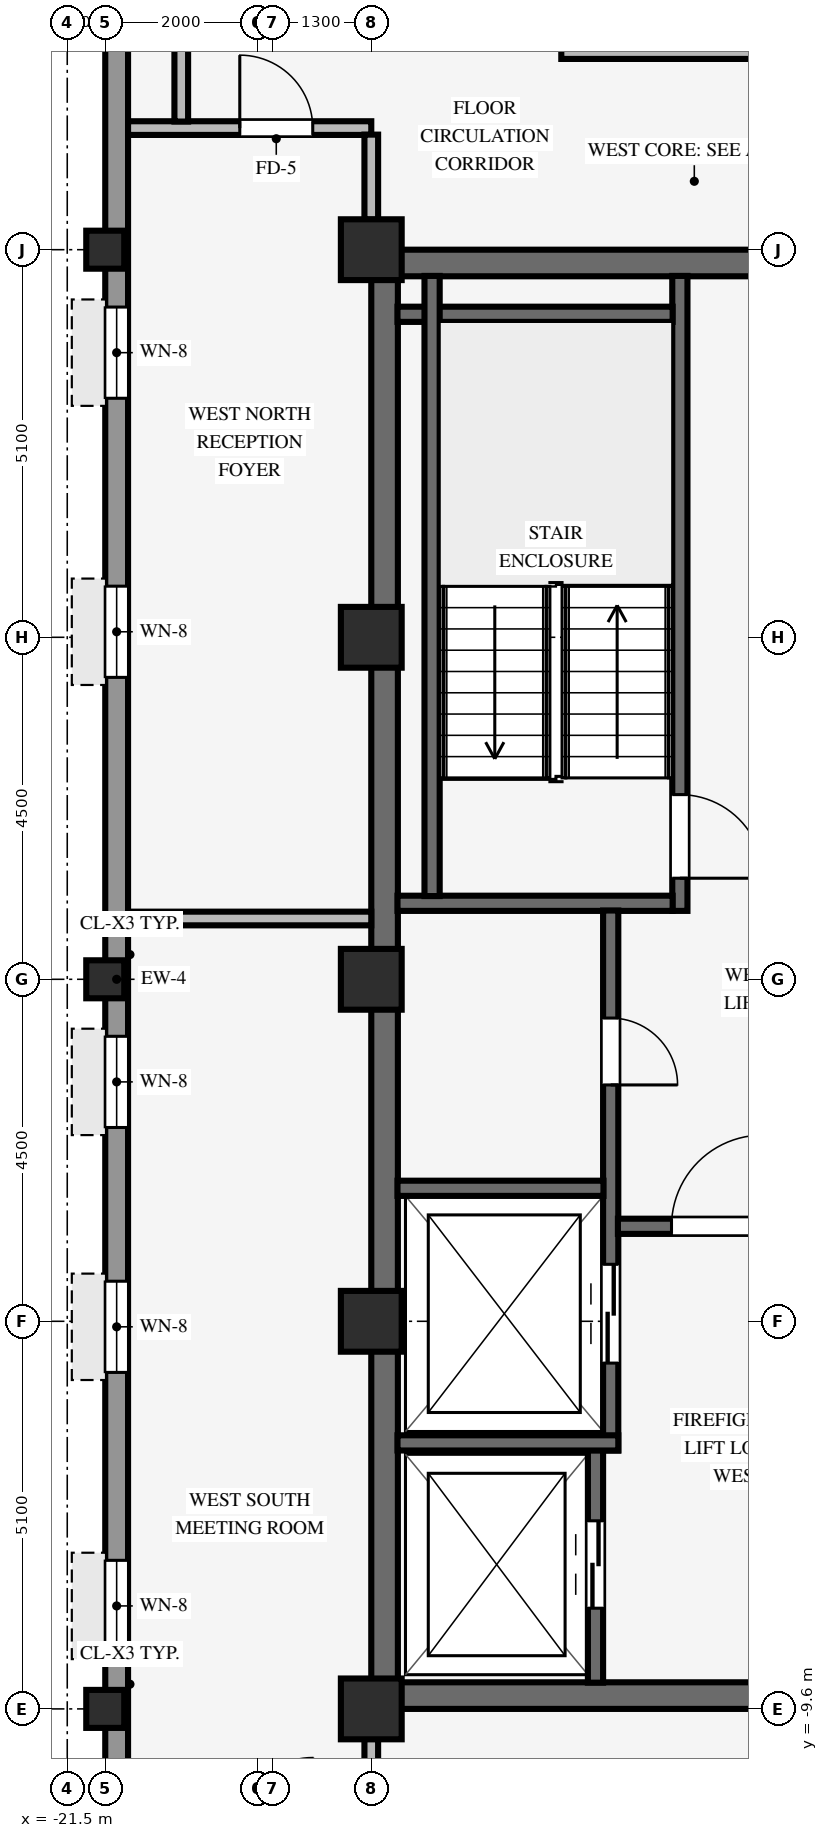
"""IFC4 building model, lengths in metres.
Left out: names, types, materials, properties, quantities, classifications, styles, units other than length and angle.
Written with IfcOpenShell. Run it as: python <this file> out.ifc"""

import sys

from ifc_helpers import new_model, si_unit, direction, frame, frame_2d, origin, origin_2d, place, context, subcontext, project, spatial, rectangle, hollow_rectangle, extrude, source, transform, mapped, element, fill, save


model = new_model("IFC4")
c1 = context("Model", 3, precision=1e-05, world=origin(), true_north=direction((0.0, 1.0)))
c2 = subcontext(c1, "Body", "Model", "MODEL_VIEW")
j1 = project(units=[si_unit("LENGTHUNIT", "METRE"), si_unit("PLANEANGLEUNIT", "RADIAN")], contexts=[c1])
p1 = place(None, origin())
s1 = spatial("IfcSite", under=j1, at=p1, CompositionType="ELEMENT")
p2 = place(p1, origin())
s2 = spatial("IfcBuilding", under=s1, at=p2, CompositionType="ELEMENT")
p3 = place(p2, frame((0.0, 0.0, 279.85)))
s3 = spatial("IfcBuildingStorey", under=s2, at=p3, CompositionType="ELEMENT", Elevation=279.85)
for number, where, z_axis, x_axis in (
    (1, (-17.5, -9.425, 0.0), (0.0, 0.0, 1.0), (1.0, 0.0, 0.0)),
    (2, (-17.5, 9.425, 0.0), (0.0, 0.0, 1.0), (1.0, 0.0, 0.0)),
):
    element("IfcWall", number, at=place(p3, frame(where, z_axis=z_axis, x_axis=x_axis)), inside=s3, PredefinedType="SHEAR", context=c2, shape_type="SweptSolid", body=[
        extrude(rectangle(XDim=8.5, YDim=0.35, at=frame_2d((4.25, 0.0))), origin(), (0.0, 0.0, 1.0), 3.37),
    ])
p4 = place(p3, frame((-17.325, -9.255, 0.0), z_axis=(0.0, 0.0, 1.0), x_axis=(0.0, 1.0, 0.0)))
e3 = element("IfcWall", 3, at=p4, inside=s3, PredefinedType="SHEAR", context=c2, shape_type="SweptSolid", body=[
    extrude(rectangle(XDim=18.51, YDim=0.35, at=frame_2d((9.255, 0.0))), origin(), (0.0, 0.0, 1.0), 3.37),
])
for number, where, z_axis, x_axis in (
    (4, (-17.5, -9.6, 0.0), (0.0, 0.0, 1.0), (1.0, 0.0, 0.0)),
    (5, (-17.5, -4.5, 0.0), (0.0, 0.0, 1.0), (1.0, 0.0, 0.0)),
    (6, (-17.5, 4.5, 0.0), (0.0, 0.0, 1.0), (1.0, 0.0, 0.0)),
    (7, (-17.5, 9.6, 0.0), (0.0, 0.0, 1.0), (1.0, 0.0, 0.0)),
    (8, (-17.5, 0.0, 0.0), (0.0, 0.0, 1.0), (1.0, 0.0, 0.0)),
):
    element("IfcColumn", number, at=place(p3, frame(where, z_axis=z_axis, x_axis=x_axis)), inside=s3, PredefinedType="COLUMN", context=c2, shape_type="SweptSolid", body=[
        extrude(rectangle(XDim=0.8, YDim=0.8, at=origin_2d()), origin(), (0.0, 0.0, 1.0), 3.37),
    ])
for number, where, z_axis, x_axis in (
    (9, (-21.0, -9.6, 0.0), (0.0, 0.0, 1.0), (1.0, 0.0, 0.0)),
    (10, (-21.0, 0.0, 0.0), (0.0, 0.0, 1.0), (1.0, 0.0, 0.0)),
    (11, (-21.0, 9.6, 0.0), (0.0, 0.0, 1.0), (1.0, 0.0, 0.0)),
):
    element("IfcColumn", number, at=place(p3, frame(where, z_axis=z_axis, x_axis=x_axis)), inside=s3, PredefinedType="COLUMN", context=c2, shape_type="SweptSolid", body=[
        extrude(hollow_rectangle(XDim=0.5, YDim=0.5, WallThickness=0.032, InnerFilletRadius=0.032, OuterFilletRadius=0.064, at=origin_2d()), origin(), (0.0, 0.0, 1.0), 3.37),
    ])
p5 = place(p3, frame((-20.85, -17.004, 0.0), z_axis=(0.0, 0.0, 1.0), x_axis=(0.0, 1.0, 0.0)))
e12 = element("IfcWall", 12, at=p5, inside=s3, PredefinedType="STANDARD", context=c2, shape_type="SweptSolid", body=[
    extrude(rectangle(XDim=34.008, YDim=0.3, at=frame_2d((17.004, 0.0))), origin(), (0.0, 0.0, 1.0), 2.705),
])
p6 = place(p5, frame((1.786, 0.0, 0.8)))
e13 = element("IfcOpeningElement", 13, at=p6, cuts=e12, PredefinedType="OPENING", context=c2, shape_type="SweptSolid", body=[
    extrude(rectangle(XDim=1.2, YDim=1.48, at=frame_2d((0.6, 0.74))), frame((0.0, 0.16, 0.0), z_axis=(0.0, -1.0, 0.0), x_axis=(1.0, 0.0, 0.0)), (0.0, 0.0, 1.0), 0.32),
])
p7 = place(p5, frame((8.159, 0.0, 0.8)))
e14 = element("IfcOpeningElement", 14, at=p7, cuts=e12, PredefinedType="OPENING", context=c2, shape_type="SweptSolid", body=[
    extrude(rectangle(XDim=1.2, YDim=1.48, at=frame_2d((0.6, 0.74))), frame((0.0, 0.16, 0.0), z_axis=(0.0, -1.0, 0.0), x_axis=(1.0, 0.0, 0.0)), (0.0, 0.0, 1.0), 0.32),
])
p8 = place(p5, frame((11.831, 0.0, 0.8)))
e15 = element("IfcOpeningElement", 15, at=p8, cuts=e12, PredefinedType="OPENING", context=c2, shape_type="SweptSolid", body=[
    extrude(rectangle(XDim=1.2, YDim=1.48, at=frame_2d((0.6, 0.74))), frame((0.0, 0.16, 0.0), z_axis=(0.0, -1.0, 0.0), x_axis=(1.0, 0.0, 0.0)), (0.0, 0.0, 1.0), 0.32),
])
p9 = place(p5, frame((15.054, 0.0, 0.8)))
e16 = element("IfcOpeningElement", 16, at=p9, cuts=e12, PredefinedType="OPENING", context=c2, shape_type="SweptSolid", body=[
    extrude(rectangle(XDim=1.2, YDim=1.48, at=frame_2d((0.6, 0.74))), frame((0.0, 0.16, 0.0), z_axis=(0.0, -1.0, 0.0), x_axis=(1.0, 0.0, 0.0)), (0.0, 0.0, 1.0), 0.32),
])
p10 = place(p5, frame((20.977, 0.0, 0.8)))
e17 = element("IfcOpeningElement", 17, at=p10, cuts=e12, PredefinedType="OPENING", context=c2, shape_type="SweptSolid", body=[
    extrude(rectangle(XDim=1.2, YDim=1.48, at=frame_2d((0.6, 0.74))), frame((0.0, 0.16, 0.0), z_axis=(0.0, -1.0, 0.0), x_axis=(1.0, 0.0, 0.0)), (0.0, 0.0, 1.0), 0.32),
])
p11 = place(p5, frame((24.649, 0.0, 0.8)))
e18 = element("IfcOpeningElement", 18, at=p11, cuts=e12, PredefinedType="OPENING", context=c2, shape_type="SweptSolid", body=[
    extrude(rectangle(XDim=1.2, YDim=1.48, at=frame_2d((0.6, 0.74))), frame((0.0, 0.16, 0.0), z_axis=(0.0, -1.0, 0.0), x_axis=(1.0, 0.0, 0.0)), (0.0, 0.0, 1.0), 0.32),
])
p12 = place(p5, frame((31.022, 0.0, 0.8)))
e19 = element("IfcOpeningElement", 19, at=p12, cuts=e12, PredefinedType="OPENING", context=c2, shape_type="SweptSolid", body=[
    extrude(rectangle(XDim=1.2, YDim=1.48, at=frame_2d((0.6, 0.74))), frame((0.0, 0.16, 0.0), z_axis=(0.0, -1.0, 0.0), x_axis=(1.0, 0.0, 0.0)), (0.0, 0.0, 1.0), 0.32),
])
p13 = place(p3, frame((-13.44, 0.9, 0.0), z_axis=(0.0, 0.0, 1.0), x_axis=(0.0, 1.0, 0.0)))
e20 = element("IfcWall", 20, at=p13, inside=s3, PredefinedType="SHEAR", context=c2, shape_type="SweptSolid", body=[
    extrude(rectangle(XDim=8.355, YDim=0.2, at=frame_2d((4.177, 0.0))), origin(), (0.0, 0.0, 1.0), 3.37),
])
p14 = place(p13, frame((1.53, 0.0, 0.0), z_axis=(0.0, 0.0, 1.0), x_axis=(-1.0, 0.0, 0.0)))
e21 = element("IfcOpeningElement", 21, at=p14, cuts=e20, PredefinedType="OPENING", context=c2, shape_type="SweptSolid", body=[
    extrude(rectangle(XDim=1.1, YDim=2.15, at=frame_2d((0.55, 1.075))), frame((0.0, 0.11, 0.0), z_axis=(0.0, -1.0, 0.0), x_axis=(1.0, 0.0, 0.0)), (0.0, 0.0, 1.0), 0.22),
])
for number, where, z_axis, x_axis in (
    (22, (-17.155, 1.0, 0.0), (0.0, 0.0, 1.0), (1.0, 0.0, 0.0)),
    (23, (-17.155, 8.75, 0.0), (0.0, 0.0, 1.0), (1.0, 0.0, 0.0)),
):
    element("IfcWall", number, at=place(p3, frame(where, z_axis=z_axis, x_axis=x_axis)), inside=s3, PredefinedType="SHEAR", context=c2, shape_type="SweptSolid", body=[
        extrude(rectangle(XDim=3.62, YDim=0.2, at=frame_2d((1.81, 0.0))), origin(), (0.0, 0.0, 1.0), 3.37),
    ])
p15 = place(p3, frame((-16.7, 1.095, 0.0), z_axis=(0.0, 0.0, 1.0), x_axis=(0.0, 1.0, 0.0)))
e24 = element("IfcWall", 24, at=p15, inside=s3, PredefinedType="SHEAR", context=c2, shape_type="SweptSolid", body=[
    extrude(rectangle(XDim=8.16, YDim=0.2, at=frame_2d((4.08, 0.0))), origin(), (0.0, 0.0, 1.0), 3.37),
])
p16 = place(p3, frame((-14.55, -9.255, 0.0), z_axis=(0.0, 0.0, 1.0), x_axis=(0.0, 1.0, 0.0)))
e25 = element("IfcWall", 25, at=p16, inside=s3, PredefinedType="SHEAR", context=c2, shape_type="SweptSolid", body=[
    extrude(rectangle(XDim=3.06, YDim=0.2, at=frame_2d((1.53, 0.0))), origin(), (0.0, 0.0, 1.0), 3.37),
])
p17 = place(p16, frame((0.98, 0.0, 0.0)))
e26 = element("IfcOpeningElement", 26, at=p17, cuts=e25, PredefinedType="OPENING", context=c2, shape_type="SweptSolid", body=[
    extrude(rectangle(XDim=1.15, YDim=2.15, at=frame_2d((0.575, 1.075))), frame((0.0, 0.11, 0.0), z_axis=(0.0, -1.0, 0.0), x_axis=(1.0, 0.0, 0.0)), (0.0, 0.0, 1.0), 0.22),
])
p18 = place(p3, frame((-14.35, -6.2, 0.0), z_axis=(0.0, 0.0, 1.0), x_axis=(0.0, 1.0, 0.0)))
e27 = element("IfcWall", 27, at=p18, inside=s3, PredefinedType="SHEAR", context=c2, shape_type="SweptSolid", body=[
    extrude(rectangle(XDim=7.105, YDim=0.2, at=frame_2d((3.552, 0.0))), origin(), (0.0, 0.0, 1.0), 3.37),
])
p19 = place(p18, frame((5.69, 0.0, 0.0), z_axis=(0.0, 0.0, 1.0), x_axis=(-1.0, 0.0, 0.0)))
e28 = element("IfcOpeningElement", 28, at=p19, cuts=e27, PredefinedType="OPENING", context=c2, shape_type="SweptSolid", body=[
    extrude(rectangle(XDim=0.88, YDim=2.1, at=frame_2d((0.44, 1.05))), frame((0.0, 0.11, 0.0), z_axis=(0.0, -1.0, 0.0), x_axis=(1.0, 0.0, 0.0)), (0.0, 0.0, 1.0), 0.22),
])
p20 = place(p18, frame((1.15, 0.0, 0.0)))
e29 = element("IfcOpeningElement", 29, at=p20, cuts=e27, PredefinedType="OPENING", context=c2, shape_type="SweptSolid", body=[
    extrude(rectangle(XDim=1.3, YDim=2.2, at=frame_2d((0.65, 1.1))), frame((0.0, 0.11, 0.0), z_axis=(0.0, -1.0, 0.0), x_axis=(1.0, 0.0, 0.0)), (0.0, 0.0, 1.0), 0.22),
])
p21 = place(p3, frame((-17.155, -6.1, 0.0), z_axis=(0.0, 0.0, 1.0), x_axis=(1.0, 0.0, 0.0)))
e30 = element("IfcWall", 30, at=p21, inside=s3, PredefinedType="SHEAR", context=c2, shape_type="SweptSolid", body=[
    extrude(rectangle(XDim=2.905, YDim=0.2, at=frame_2d((1.453, 0.0))), origin(), (0.0, 0.0, 1.0), 3.37),
])
p22 = place(p3, frame((-17.155, -2.75, 0.0), z_axis=(0.0, 0.0, 1.0), x_axis=(1.0, 0.0, 0.0)))
e31 = element("IfcWall", 31, at=p22, inside=s3, PredefinedType="SHEAR", context=c2, shape_type="SweptSolid", body=[
    extrude(rectangle(XDim=2.71, YDim=0.2, at=frame_2d((1.355, 0.0))), origin(), (0.0, 0.0, 1.0), 3.37),
])
p23 = place(p3, frame((-14.255, -3.25, 0.0), z_axis=(0.0, 0.0, 1.0), x_axis=(1.0, 0.0, 0.0)))
e32 = element("IfcWall", 32, at=p23, inside=s3, PredefinedType="SHEAR", context=c2, shape_type="SweptSolid", body=[
    extrude(rectangle(XDim=2.56, YDim=0.2, at=frame_2d((1.28, 0.0))), origin(), (0.0, 0.0, 1.0), 3.37),
])
p24 = place(p23, frame((0.705, 0.0, 0.0)))
e33 = element("IfcOpeningElement", 33, at=p24, cuts=e32, PredefinedType="OPENING", context=c2, shape_type="SweptSolid", body=[
    extrude(rectangle(XDim=1.2, YDim=2.15, at=frame_2d((0.6, 1.075))), frame((0.0, 0.11, 0.0), z_axis=(0.0, -1.0, 0.0), x_axis=(1.0, 0.0, 0.0)), (0.0, 0.0, 1.0), 0.22),
])
p25 = place(p3, frame((-20.7, 0.8, 0.0), z_axis=(0.0, 0.0, 1.0), x_axis=(1.0, 0.0, 0.0)))
e34 = element("IfcWall", 34, at=p25, inside=s3, PredefinedType="PARTITIONING", context=c2, shape_type="SweptSolid", body=[
    extrude(rectangle(XDim=3.2, YDim=0.18, at=frame_2d((1.6, 0.0))), origin(), (0.0, 0.0, 1.0), 3.36),
])
p26 = place(p3, frame((-20.7, 11.2, 0.0), z_axis=(0.0, 0.0, 1.0), x_axis=(1.0, 0.0, 0.0)))
e35 = element("IfcWall", 35, at=p26, inside=s3, PredefinedType="PARTITIONING", context=c2, shape_type="SweptSolid", body=[
    extrude(rectangle(XDim=3.2, YDim=0.18, at=frame_2d((1.6, 0.0))), origin(), (0.0, 0.0, 1.0), 3.36),
])
p27 = place(p26, frame((1.47, 0.0, 0.0)))
e36 = element("IfcOpeningElement", 36, at=p27, cuts=e35, PredefinedType="OPENING", context=c2, shape_type="SweptSolid", body=[
    extrude(rectangle(XDim=0.96, YDim=2.1, at=frame_2d((0.48, 1.05))), frame((0.0, 0.1, 0.0), z_axis=(0.0, -1.0, 0.0), x_axis=(1.0, 0.0, 0.0)), (0.0, 0.0, 1.0), 0.2),
])
p28 = place(p3, frame((-15.0, 12.2, 0.0), z_axis=(0.0, 0.0, 1.0), x_axis=(1.0, 0.0, 0.0)))
e37 = element("IfcWall", 37, at=p28, inside=s3, PredefinedType="PARTITIONING", context=c2, shape_type="SweptSolid", body=[
    extrude(rectangle(XDim=30.8, YDim=0.18, at=frame_2d((15.4, 0.0))), origin(), (0.0, 0.0, 1.0), 3.36),
])
p29 = place(p28, frame((11.52, 0.0, 0.0)))
e38 = element("IfcOpeningElement", 38, at=p29, cuts=e37, PredefinedType="OPENING", context=c2, shape_type="SweptSolid", body=[
    extrude(rectangle(XDim=0.96, YDim=2.1, at=frame_2d((0.48, 1.05))), frame((0.0, 0.1, 0.0), z_axis=(0.0, -1.0, 0.0), x_axis=(1.0, 0.0, 0.0)), (0.0, 0.0, 1.0), 0.2),
])
p30 = place(p28, frame((2.52, 0.0, 0.0)))
e39 = element("IfcOpeningElement", 39, at=p30, cuts=e37, PredefinedType="OPENING", context=c2, shape_type="SweptSolid", body=[
    extrude(rectangle(XDim=0.96, YDim=2.1, at=frame_2d((0.48, 1.05))), frame((0.0, 0.1, 0.0), z_axis=(0.0, -1.0, 0.0), x_axis=(1.0, 0.0, 0.0)), (0.0, 0.0, 1.0), 0.2),
])
p31 = place(p28, frame((28.32, 0.0, 0.0)))
e40 = element("IfcOpeningElement", 40, at=p31, cuts=e37, PredefinedType="OPENING", context=c2, shape_type="SweptSolid", body=[
    extrude(rectangle(XDim=0.96, YDim=2.1, at=frame_2d((0.48, 1.05))), frame((0.0, 0.1, 0.0), z_axis=(0.0, -1.0, 0.0), x_axis=(1.0, 0.0, 0.0)), (0.0, 0.0, 1.0), 0.2),
])
p32 = place(p28, frame((24.92, 0.0, 0.0)))
e41 = element("IfcOpeningElement", 41, at=p32, cuts=e37, PredefinedType="OPENING", context=c2, shape_type="SweptSolid", body=[
    extrude(rectangle(XDim=0.96, YDim=2.1, at=frame_2d((0.48, 1.05))), frame((0.0, 0.1, 0.0), z_axis=(0.0, -1.0, 0.0), x_axis=(1.0, 0.0, 0.0)), (0.0, 0.0, 1.0), 0.2),
])
p33 = place(p28, frame((16.2, 0.0, 0.0)))
e42 = element("IfcOpeningElement", 42, at=p33, cuts=e37, PredefinedType="OPENING", context=c2, shape_type="SweptSolid", body=[
    extrude(rectangle(XDim=0.9, YDim=2.1, at=frame_2d((0.45, 1.05))), frame((0.0, 0.1, 0.0), z_axis=(0.0, -1.0, 0.0), x_axis=(1.0, 0.0, 0.0)), (0.0, 0.0, 1.0), 0.2),
])
p34 = place(p28, frame((18.3, 0.0, 0.0)))
e43 = element("IfcOpeningElement", 43, at=p34, cuts=e37, PredefinedType="OPENING", context=c2, shape_type="SweptSolid", body=[
    extrude(rectangle(XDim=0.9, YDim=2.1, at=frame_2d((0.45, 1.05))), frame((0.0, 0.1, 0.0), z_axis=(0.0, -1.0, 0.0), x_axis=(1.0, 0.0, 0.0)), (0.0, 0.0, 1.0), 0.2),
])
p35 = place(p28, frame((20.25, 0.0, 0.0)))
e44 = element("IfcOpeningElement", 44, at=p35, cuts=e37, PredefinedType="OPENING", context=c2, shape_type="SweptSolid", body=[
    extrude(rectangle(XDim=0.9, YDim=2.1, at=frame_2d((0.45, 1.05))), frame((0.0, 0.1, 0.0), z_axis=(0.0, -1.0, 0.0), x_axis=(1.0, 0.0, 0.0)), (0.0, 0.0, 1.0), 0.2),
])
p36 = place(p3, frame((-20.0, 11.286, 0.0), z_axis=(0.0, 0.0, 1.0), x_axis=(0.0, 1.0, 0.0)))
e45 = element("IfcWall", 45, at=p36, inside=s3, PredefinedType="PARTITIONING", context=c2, shape_type="SweptSolid", body=[
    extrude(rectangle(XDim=2.228, YDim=0.18, at=frame_2d((1.114, 0.0))), origin(), (0.0, 0.0, 1.0), 3.36),
])
for number, where, z_axis, x_axis in (
    (46, (-17.5, -11.114, 0.0), (0.0, 0.0, 1.0), (0.0, 1.0, 0.0)),
    (47, (-17.5, 9.996, 0.0), (0.0, 0.0, 1.0), (0.0, 1.0, 0.0)),
):
    element("IfcWall", number, at=place(p3, frame(where, z_axis=z_axis, x_axis=x_axis)), inside=s3, PredefinedType="PARTITIONING", context=c2, shape_type="SweptSolid", body=[
        extrude(rectangle(XDim=1.118, YDim=0.18, at=frame_2d((0.559, 0.0))), origin(), (0.0, 0.0, 1.0), 2.892),
    ])
m1 = source(origin(), c2, "Body", "SweptSolid", [
    extrude(rectangle(XDim=1.2, YDim=1.48, at=frame_2d((0.6, 0.74))), frame((0.0, 0.03, 0.0), z_axis=(0.0, -1.0, 0.0), x_axis=(1.0, 0.0, 0.0)), (0.0, 0.0, 1.0), 0.06),
])
p37 = place(p7, origin())
e48 = element("IfcWindow", 48, at=p37, inside=s3, PartitioningType="SINGLE_PANEL", PredefinedType="WINDOW", context=c2, shape_type="MappedRepresentation", body=[
    mapped(m1, transform((0.0, 0.0, 0.0), scale=1.0)),
])
fill(e14, e48)
p38 = place(p8, origin())
e49 = element("IfcWindow", 49, at=p38, inside=s3, PartitioningType="SINGLE_PANEL", PredefinedType="WINDOW", context=c2, shape_type="MappedRepresentation", body=[
    mapped(m1, transform((0.0, 0.0, 0.0), scale=1.0)),
])
fill(e15, e49)
p39 = place(p9, origin())
e50 = element("IfcWindow", 50, at=p39, inside=s3, PartitioningType="SINGLE_PANEL", PredefinedType="WINDOW", context=c2, shape_type="MappedRepresentation", body=[
    mapped(m1, transform((0.0, 0.0, 0.0), scale=1.0)),
])
fill(e16, e50)
p40 = place(p10, origin())
e51 = element("IfcWindow", 51, at=p40, inside=s3, PartitioningType="SINGLE_PANEL", PredefinedType="WINDOW", context=c2, shape_type="MappedRepresentation", body=[
    mapped(m1, transform((0.0, 0.0, 0.0), scale=1.0)),
])
fill(e17, e51)
p41 = place(p11, origin())
e52 = element("IfcWindow", 52, at=p41, inside=s3, PartitioningType="SINGLE_PANEL", PredefinedType="WINDOW", context=c2, shape_type="MappedRepresentation", body=[
    mapped(m1, transform((0.0, 0.0, 0.0), scale=1.0)),
])
fill(e18, e52)
m2 = source(origin(), c2, "Body", "SweptSolid", [
    extrude(rectangle(XDim=1.1, YDim=2.15, at=frame_2d((0.55, 1.075))), frame((0.0, 0.025, 0.0), z_axis=(0.0, -1.0, 0.0), x_axis=(1.0, 0.0, 0.0)), (0.0, 0.0, 1.0), 0.05),
])
p42 = place(p14, origin())
e53 = element("IfcDoor", 53, at=p42, inside=s3, OperationType="SINGLE_SWING_RIGHT", PredefinedType="DOOR", context=c2, shape_type="MappedRepresentation", body=[
    mapped(m2, transform((0.0, 0.0, 0.0), scale=1.0)),
])
fill(e21, e53)
m3 = source(origin(), c2, "Body", "SweptSolid", [
    extrude(rectangle(XDim=0.88, YDim=2.1, at=frame_2d((0.44, 1.05))), frame((0.0, 0.025, 0.0), z_axis=(0.0, -1.0, 0.0), x_axis=(1.0, 0.0, 0.0)), (0.0, 0.0, 1.0), 0.05),
])
p43 = place(p19, origin())
e54 = element("IfcDoor", 54, at=p43, inside=s3, OperationType="SINGLE_SWING_RIGHT", PredefinedType="DOOR", context=c2, shape_type="MappedRepresentation", body=[
    mapped(m3, transform((0.0, 0.0, 0.0), scale=1.0)),
])
fill(e28, e54)
m4 = source(origin(), c2, "Body", "SweptSolid", [
    extrude(rectangle(XDim=1.2, YDim=2.15, at=frame_2d((0.6, 1.075))), frame((0.0, 0.025, 0.0), z_axis=(0.0, -1.0, 0.0), x_axis=(1.0, 0.0, 0.0)), (0.0, 0.0, 1.0), 0.05),
])
p44 = place(p24, origin())
e55 = element("IfcDoor", 55, at=p44, inside=s3, OperationType="SINGLE_SWING_RIGHT", PredefinedType="DOOR", context=c2, shape_type="MappedRepresentation", body=[
    mapped(m4, transform((0.0, 0.0, 0.0), scale=1.0)),
])
fill(e33, e55)
m5 = source(origin(), c2, "Body", "SweptSolid", [
    extrude(rectangle(XDim=1.15, YDim=2.15, at=frame_2d((0.575, 1.075))), frame((0.0, 0.025, 0.0), z_axis=(0.0, -1.0, 0.0), x_axis=(1.0, 0.0, 0.0)), (0.0, 0.0, 1.0), 0.05),
])
p45 = place(p17, origin())
e56 = element("IfcDoor", 56, at=p45, inside=s3, OperationType="DOUBLE_DOOR_SLIDING", PredefinedType="DOOR", context=c2, shape_type="MappedRepresentation", body=[
    mapped(m5, transform((0.0, 0.0, 0.0), scale=1.0)),
])
fill(e26, e56)
m6 = source(origin(), c2, "Body", "SweptSolid", [
    extrude(rectangle(XDim=1.3, YDim=2.2, at=frame_2d((0.65, 1.1))), frame((0.0, 0.025, 0.0), z_axis=(0.0, -1.0, 0.0), x_axis=(1.0, 0.0, 0.0)), (0.0, 0.0, 1.0), 0.05),
])
p46 = place(p20, origin())
e57 = element("IfcDoor", 57, at=p46, inside=s3, OperationType="DOUBLE_DOOR_SLIDING", PredefinedType="DOOR", context=c2, shape_type="MappedRepresentation", body=[
    mapped(m6, transform((0.0, 0.0, 0.0), scale=1.0)),
])
fill(e29, e57)
m7 = source(origin(), c2, "Body", "SweptSolid", [
    extrude(rectangle(XDim=0.96, YDim=2.1, at=frame_2d((0.48, 1.05))), frame((0.0, 0.025, 0.0), z_axis=(0.0, -1.0, 0.0), x_axis=(1.0, 0.0, 0.0)), (0.0, 0.0, 1.0), 0.05),
])
p47 = place(p27, origin())
e58 = element("IfcDoor", 58, at=p47, inside=s3, OperationType="SINGLE_SWING_LEFT", PredefinedType="DOOR", context=c2, shape_type="MappedRepresentation", body=[
    mapped(m7, transform((0.0, 0.0, 0.0), scale=1.0)),
])
fill(e36, e58)
save(model, sys.argv[1])
